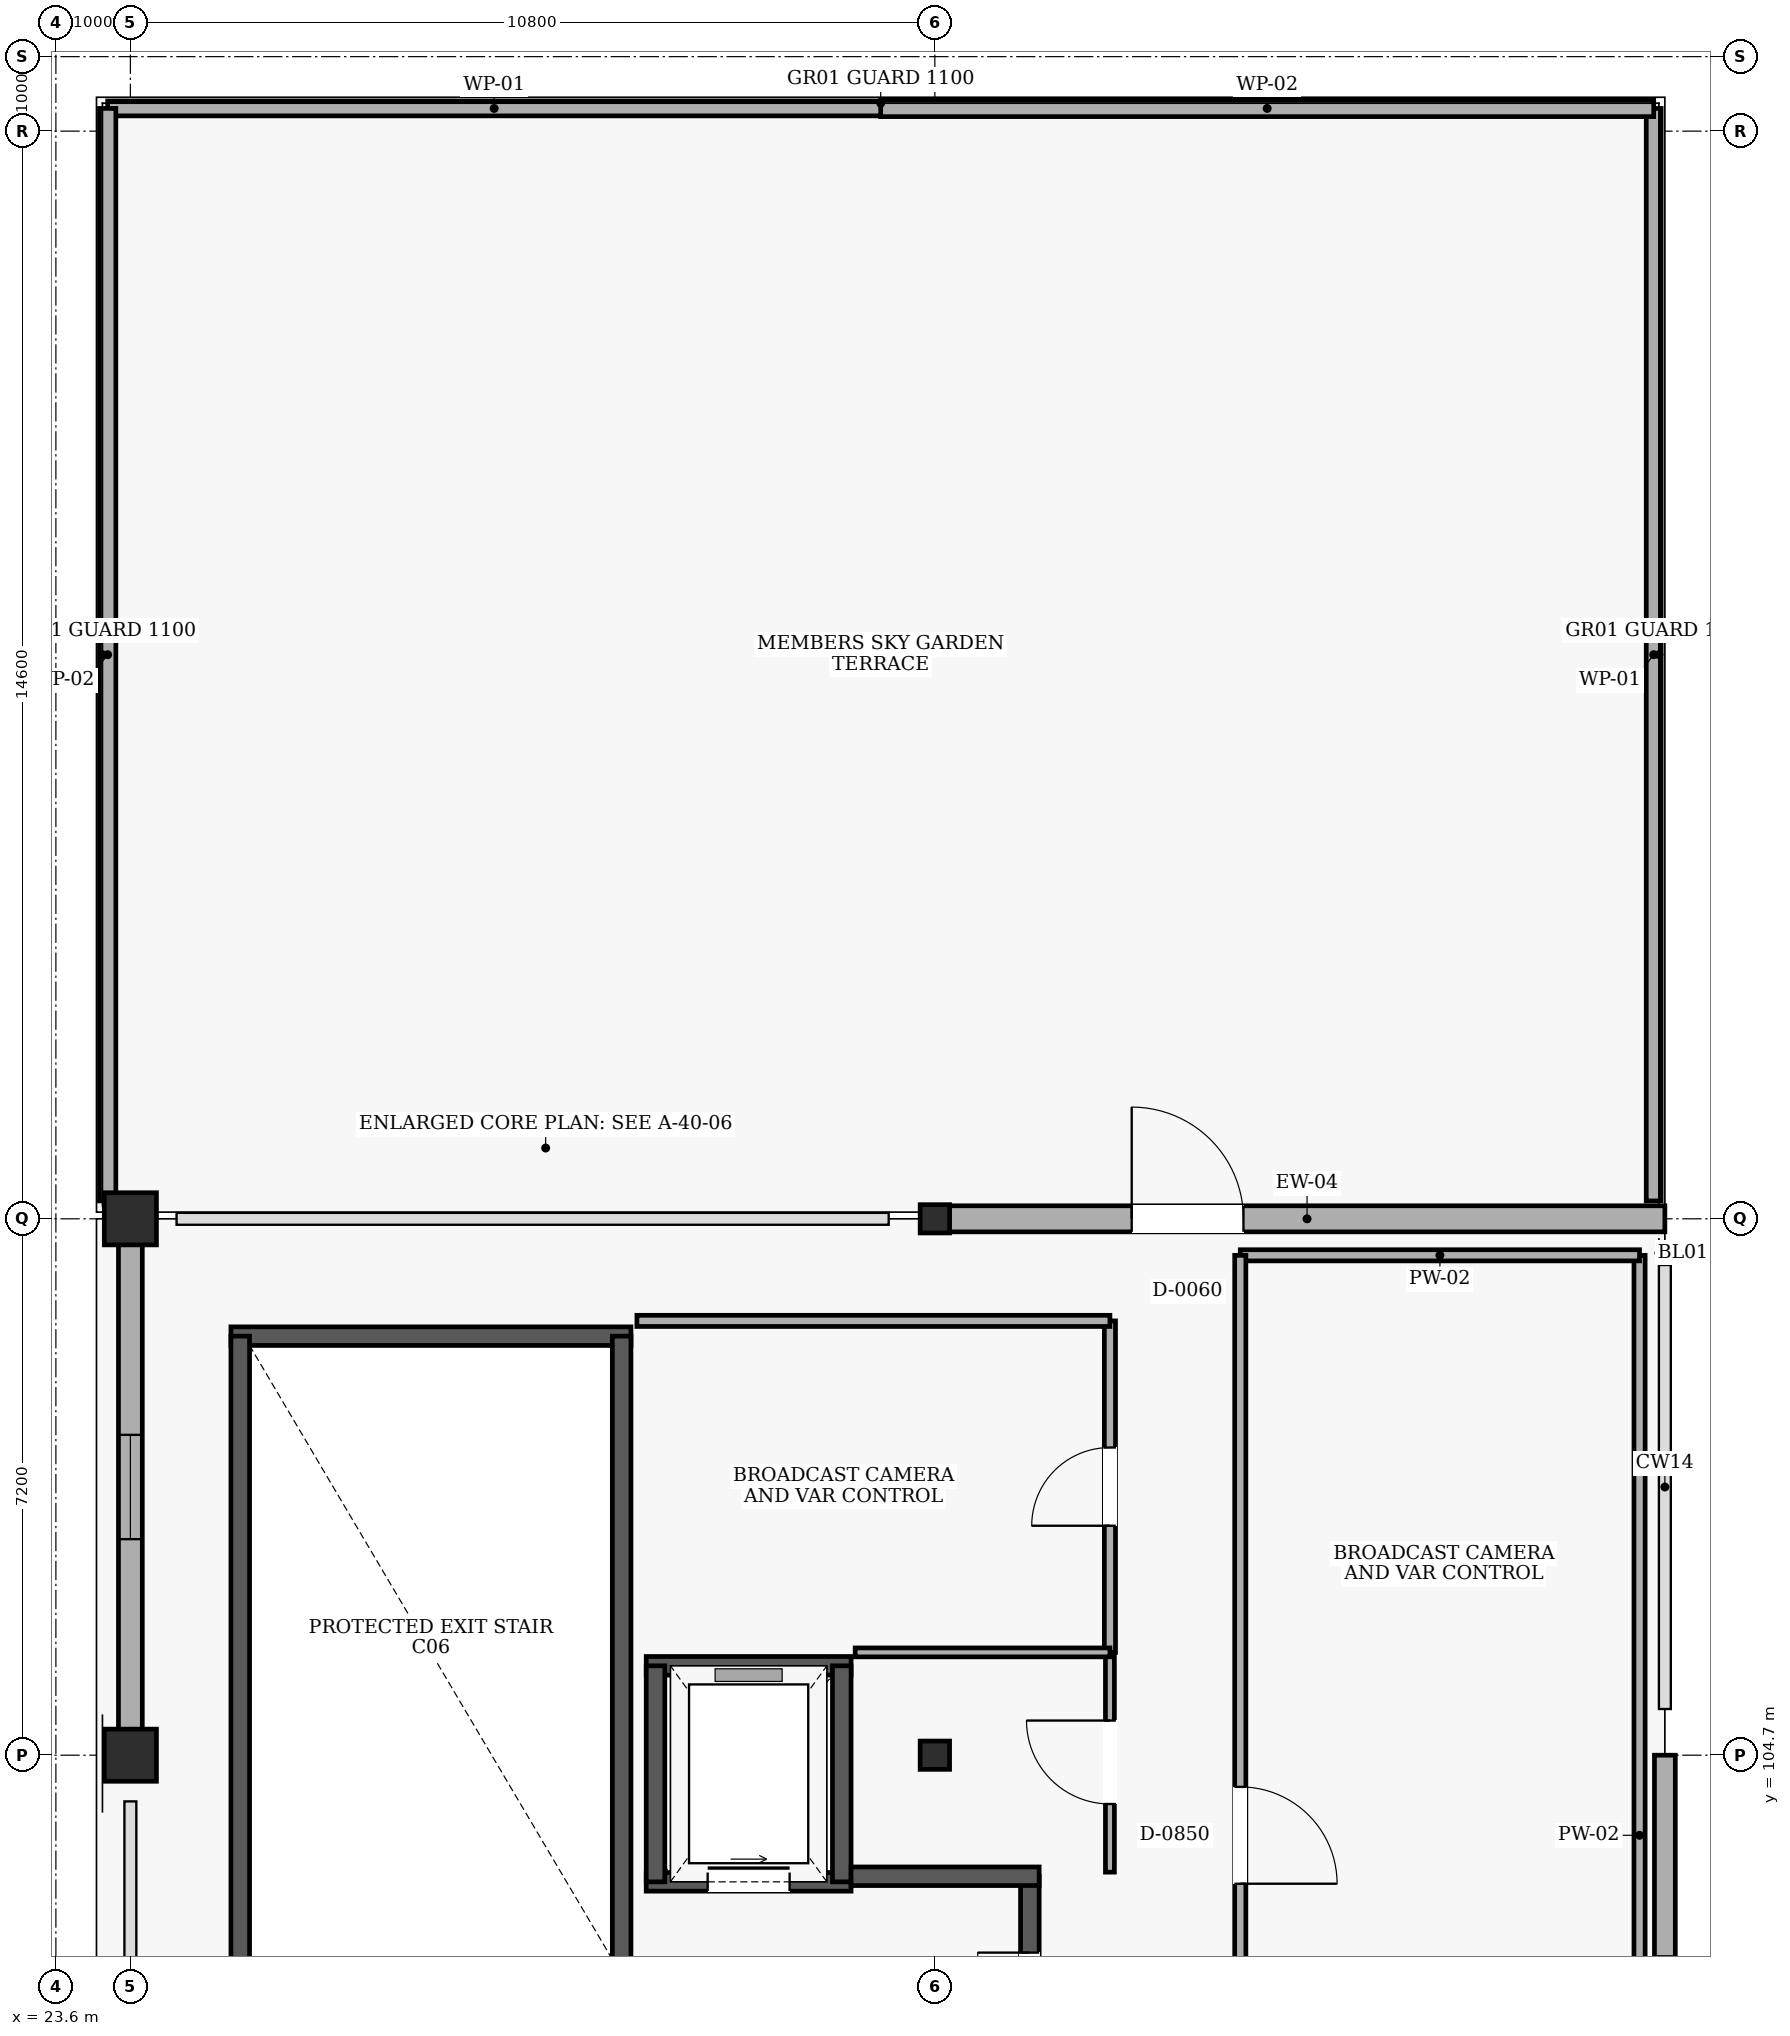
"""IFC4 building model, lengths in metres.
Left out: names, types, materials, properties, quantities, classifications, styles, units other than length and angle.
Written with IfcOpenShell. Run it as: python <this file> out.ifc"""

import sys

from ifc_helpers import new_model, si_unit, direction, frame, frame_2d, origin, origin_2d, place, context, subcontext, project, spatial, rectangle, i_section, extrude, element, fill, save


model = new_model("IFC4")
c1 = context("Model", 3, precision=1e-05, world=origin(), true_north=direction((0.0, 1.0)))
c2 = subcontext(c1, "Body", "Model", "MODEL_VIEW")
j1 = project(units=[si_unit("LENGTHUNIT", "METRE"), si_unit("PLANEANGLEUNIT", "RADIAN")], contexts=[c1])
p1 = place(None, origin())
s1 = spatial("IfcSite", under=j1, at=p1, CompositionType="ELEMENT")
p2 = place(p1, origin())
s2 = spatial("IfcBuilding", under=s1, at=p2, CompositionType="ELEMENT")
p3 = place(p2, frame((0.0, 0.0, 29.4)))
s3 = spatial("IfcBuildingStorey", under=s2, at=p3, CompositionType="ELEMENT", Elevation=29.4)
for number, where, z_axis, x_axis in (
    (1, (24.6, 104.7, 0.0), (0.0, 0.0, 1.0), (1.0, 0.0, 0.0)),
    (2, (24.6, 111.9, 0.0), (0.0, 0.0, 1.0), (1.0, 0.0, 0.0)),
):
    element("IfcColumn", number, at=place(p3, frame(where, z_axis=z_axis, x_axis=x_axis)), inside=s3, PredefinedType="COLUMN", context=c2, shape_type="SweptSolid", body=[
        extrude(rectangle(XDim=0.7, YDim=0.7, at=origin_2d()), origin(), (0.0, 0.0, 1.0), 4.8),
    ])
for number, where, z_axis, x_axis in (
    (3, (35.4, 104.7, 0.0), (0.0, 0.0, 1.0), (1.0, 0.0, 0.0)),
    (4, (35.4, 111.9, 0.0), (0.0, 0.0, 1.0), (1.0, 0.0, 0.0)),
):
    element("IfcColumn", number, at=place(p3, frame(where, z_axis=z_axis, x_axis=x_axis)), inside=s3, PredefinedType="COLUMN", context=c2, shape_type="SweptSolid", body=[
        extrude(i_section(OverallWidth=0.395, OverallDepth=0.38, WebThickness=0.019, FlangeThickness=0.03, at=origin_2d()), origin(), (0.0, 0.0, 1.0), 4.8),
    ])
p4 = place(p3, frame((24.6, 105.045, 0.0), z_axis=(0.0, 0.0, 1.0), x_axis=(0.0, 1.0, 0.0)))
e5 = element("IfcWall", 5, at=p4, inside=s3, PredefinedType="SOLIDWALL", context=c2, shape_type="SweptSolid", body=[
    extrude(rectangle(XDim=6.51, YDim=0.32, at=frame_2d((3.255, 0.0))), origin(), (0.0, 0.0, 1.0), 3.68),
])
p5 = place(p4, frame((2.555, 0.0, 0.9)))
e6 = element("IfcOpeningElement", 6, at=p5, cuts=e5, PredefinedType="OPENING", context=c2, shape_type="SweptSolid", body=[
    extrude(rectangle(XDim=1.4, YDim=2.1, at=frame_2d((0.7, 1.05))), frame((0.0, 0.17, 0.0), z_axis=(0.0, -1.0, 0.0), x_axis=(1.0, 0.0, 0.0)), (0.0, 0.0, 1.0), 0.34),
])
p6 = place(p3, frame((35.593, 111.9, 0.0), z_axis=(0.0, 0.0, 1.0), x_axis=(1.0, 0.0, 0.0)))
e7 = element("IfcWall", 7, at=p6, inside=s3, PredefinedType="SOLIDWALL", context=c2, shape_type="SweptSolid", body=[
    extrude(rectangle(XDim=9.607, YDim=0.35, at=frame_2d((4.804, 0.0))), origin(), (0.0, 0.0, 1.0), 4.48),
])
p7 = place(p6, frame((2.45, 0.0, 0.0)))
e8 = element("IfcOpeningElement", 8, at=p7, cuts=e7, PredefinedType="OPENING", context=c2, shape_type="SweptSolid", body=[
    extrude(rectangle(XDim=1.5, YDim=2.15, at=frame_2d((0.75, 1.075))), frame((0.0, 0.185, 0.0), z_axis=(0.0, -1.0, 0.0), x_axis=(1.0, 0.0, 0.0)), (0.0, 0.0, 1.0), 0.37),
])
p8 = place(p3, frame((45.2, 104.7, 0.0), z_axis=(0.0, 0.0, 1.0), x_axis=(0.0, -1.0, 0.0)))
e9 = element("IfcWall", 9, at=p8, inside=s3, PredefinedType="SOLIDWALL", context=c2, shape_type="SweptSolid", body=[
    extrude(rectangle(XDim=7.2, YDim=0.28, at=frame_2d((3.6, 0.0))), origin(), (0.0, 0.0, 1.0), 4.48),
])
p9 = place(p8, frame((2.7, 0.0, 0.9)))
e10 = element("IfcOpeningElement", 10, at=p9, cuts=e9, PredefinedType="OPENING", context=c2, shape_type="SweptSolid", body=[
    extrude(rectangle(XDim=1.8, YDim=2.1, at=frame_2d((0.9, 1.05))), frame((0.0, 0.15, 0.0), z_axis=(0.0, -1.0, 0.0), x_axis=(1.0, 0.0, 0.0)), (0.0, 0.0, 1.0), 0.3),
])
p10 = place(p3, frame((45.05, 112.14, 0.0), z_axis=(0.0, 0.0, 1.0), x_axis=(0.0, 1.0, 0.0)))
e11 = element("IfcWall", 11, at=p10, inside=s3, PredefinedType="PARAPET", context=c2, shape_type="SweptSolid", body=[
    extrude(rectangle(XDim=14.665, YDim=0.2, at=frame_2d((7.333, 0.0))), origin(), (0.0, 0.0, 1.0), 1.15),
])
p11 = place(p3, frame((45.05, 126.805, 0.0), z_axis=(0.0, 0.0, 1.0), x_axis=(-1.0, 0.0, 0.0)))
e12 = element("IfcWall", 12, at=p11, inside=s3, PredefinedType="PARAPET", context=c2, shape_type="SweptSolid", body=[
    extrude(rectangle(XDim=10.377, YDim=0.22, at=frame_2d((5.189, 0.0))), origin(), (0.0, 0.0, 1.0), 1.15),
])
p12 = place(p3, frame((34.673, 126.805, 0.0), z_axis=(0.0, 0.0, 1.0), x_axis=(-1.0, 0.0, 0.0)))
e13 = element("IfcWall", 13, at=p12, inside=s3, PredefinedType="PARAPET", context=c2, shape_type="SweptSolid", body=[
    extrude(rectangle(XDim=10.378, YDim=0.2, at=frame_2d((5.189, 0.0))), origin(), (0.0, 0.0, 1.0), 1.15),
])
p13 = place(p3, frame((24.295, 126.805, 0.0), z_axis=(0.0, 0.0, 1.0), x_axis=(0.0, -1.0, 0.0)))
e14 = element("IfcWall", 14, at=p13, inside=s3, PredefinedType="PARAPET", context=c2, shape_type="SweptSolid", body=[
    extrude(rectangle(XDim=14.665, YDim=0.22, at=frame_2d((7.333, 0.0))), origin(), (0.0, 0.0, 1.0), 1.15),
])
p14 = place(p3, frame((31.32, 110.325, 0.0), z_axis=(0.0, 0.0, 1.0), x_axis=(-1.0, 0.0, 0.0)))
e15 = element("IfcWall", 15, at=p14, inside=s3, PredefinedType="SHEAR", context=c2, shape_type="SweptSolid", body=[
    extrude(rectangle(XDim=5.37, YDim=0.25, at=frame_2d((2.685, 0.0))), origin(), (0.0, 0.0, 1.0), 4.5),
])
p15 = place(p3, frame((26.075, 99.475, 0.0), z_axis=(0.0, 0.0, 1.0), x_axis=(0.0, 1.0, 0.0)))
e16 = element("IfcWall", 16, at=p15, inside=s3, PredefinedType="SHEAR", context=c2, shape_type="SweptSolid", body=[
    extrude(rectangle(XDim=10.85, YDim=0.25, at=frame_2d((5.425, 0.0))), origin(), (0.0, 0.0, 1.0), 4.5),
])
p16 = place(p3, frame((31.195, 99.475, 0.0), z_axis=(0.0, 0.0, 1.0), x_axis=(0.0, 1.0, 0.0)))
e17 = element("IfcWall", 17, at=p16, inside=s3, PredefinedType="SHEAR", context=c2, shape_type="SweptSolid", body=[
    extrude(rectangle(XDim=10.85, YDim=0.25, at=frame_2d((5.425, 0.0))), origin(), (0.0, 0.0, 1.0), 4.5),
])
p17 = place(p16, frame((0.52, 0.0, 0.0)))
e18 = element("IfcOpeningElement", 18, at=p17, cuts=e17, PredefinedType="OPENING", context=c2, shape_type="SweptSolid", body=[
    extrude(rectangle(XDim=1.4, YDim=2.15, at=frame_2d((0.7, 1.075))), frame((0.0, 0.135, 0.0), z_axis=(0.0, -1.0, 0.0), x_axis=(1.0, 0.0, 0.0)), (0.0, 0.0, 1.0), 0.27),
])
p18 = place(p3, frame((31.525, 103.0, 0.0), z_axis=(0.0, 0.0, 1.0), x_axis=(1.0, 0.0, 0.0)))
e19 = element("IfcWall", 19, at=p18, inside=s3, PredefinedType="SHEAR", context=c2, shape_type="SweptSolid", body=[
    extrude(rectangle(XDim=2.75, YDim=0.25, at=frame_2d((1.375, 0.0))), origin(), (0.0, 0.0, 1.0), 4.5),
])
p19 = place(p18, frame((0.825, 0.0, 0.0)))
e20 = element("IfcOpeningElement", 20, at=p19, cuts=e19, PredefinedType="OPENING", context=c2, shape_type="SweptSolid", body=[
    extrude(rectangle(XDim=1.1, YDim=2.15, at=frame_2d((0.55, 1.075))), frame((0.0, 0.135, 0.0), z_axis=(0.0, -1.0, 0.0), x_axis=(1.0, 0.0, 0.0)), (0.0, 0.0, 1.0), 0.27),
])
p20 = place(p3, frame((34.275, 105.9, 0.0), z_axis=(0.0, 0.0, 1.0), x_axis=(-1.0, 0.0, 0.0)))
e21 = element("IfcWall", 21, at=p20, inside=s3, PredefinedType="SHEAR", context=c2, shape_type="SweptSolid", body=[
    extrude(rectangle(XDim=2.75, YDim=0.25, at=frame_2d((1.375, 0.0))), origin(), (0.0, 0.0, 1.0), 4.5),
])
for number, where, z_axis, x_axis in (
    (22, (31.65, 105.9, 0.0), (0.0, 0.0, 1.0), (0.0, -1.0, 0.0)),
    (23, (34.15, 103.0, 0.0), (0.0, 0.0, 1.0), (0.0, 1.0, 0.0)),
):
    element("IfcWall", number, at=place(p3, frame(where, z_axis=z_axis, x_axis=x_axis)), inside=s3, PredefinedType="SHEAR", context=c2, shape_type="SweptSolid", body=[
        extrude(rectangle(XDim=2.9, YDim=0.25, at=frame_2d((1.45, 0.0))), origin(), (0.0, 0.0, 1.0), 4.5),
    ])
p21 = place(p3, frame((36.675, 99.625, 0.0), z_axis=(0.0, 0.0, 1.0), x_axis=(0.0, 1.0, 0.0)))
e24 = element("IfcWall", 24, at=p21, inside=s3, PredefinedType="SHEAR", context=c2, shape_type="SweptSolid", body=[
    extrude(rectangle(XDim=3.45, YDim=0.25, at=frame_2d((1.725, 0.0))), origin(), (0.0, 0.0, 1.0), 4.5),
])
p22 = place(p21, frame((1.025, 0.0, 0.0)))
e25 = element("IfcOpeningElement", 25, at=p22, cuts=e24, PredefinedType="OPENING", context=c2, shape_type="SweptSolid", body=[
    extrude(rectangle(XDim=1.4, YDim=2.15, at=frame_2d((0.7, 1.075))), frame((0.0, 0.135, 0.0), z_axis=(0.0, -1.0, 0.0), x_axis=(1.0, 0.0, 0.0)), (0.0, 0.0, 1.0), 0.27),
])
p23 = place(p3, frame((34.275, 103.075, 0.0), z_axis=(0.0, 0.0, 1.0), x_axis=(1.0, 0.0, 0.0)))
e26 = element("IfcWall", 26, at=p23, inside=s3, PredefinedType="SHEAR", context=c2, shape_type="SweptSolid", body=[
    extrude(rectangle(XDim=2.525, YDim=0.25, at=frame_2d((1.263, 0.0))), origin(), (0.0, 0.0, 1.0), 4.5),
])
p24 = place(p3, frame((37.75, 106.08, 0.0), z_axis=(0.0, 0.0, 1.0), x_axis=(0.0, 1.0, 0.0)))
e27 = element("IfcWall", 27, at=p24, inside=s3, PredefinedType="PARTITIONING", context=c2, shape_type="SweptSolid", body=[
    extrude(rectangle(XDim=4.45, YDim=0.15, at=frame_2d((2.225, 0.0))), origin(), (0.0, 0.0, 1.0), 4.5),
])
p25 = place(p24, frame((1.7, 0.0, 0.0)))
e28 = element("IfcOpeningElement", 28, at=p25, cuts=e27, PredefinedType="OPENING", context=c2, shape_type="SweptSolid", body=[
    extrude(rectangle(XDim=1.05, YDim=2.15, at=frame_2d((0.525, 1.075))), frame((0.0, 0.085, 0.0), z_axis=(0.0, -1.0, 0.0), x_axis=(1.0, 0.0, 0.0)), (0.0, 0.0, 1.0), 0.17),
])
p26 = place(p3, frame((37.75, 110.53, 0.0), z_axis=(0.0, 0.0, 1.0), x_axis=(-1.0, 0.0, 0.0)))
e29 = element("IfcWall", 29, at=p26, inside=s3, PredefinedType="PARTITIONING", context=c2, shape_type="SweptSolid", body=[
    extrude(rectangle(XDim=6.35, YDim=0.15, at=frame_2d((3.175, 0.0))), origin(), (0.0, 0.0, 1.0), 4.5),
])
p27 = place(p3, frame((37.75, 103.13, 0.0), z_axis=(0.0, 0.0, 1.0), x_axis=(0.0, 1.0, 0.0)))
e30 = element("IfcWall", 30, at=p27, inside=s3, PredefinedType="PARTITIONING", context=c2, shape_type="SweptSolid", body=[
    extrude(rectangle(XDim=2.95, YDim=0.12, at=frame_2d((1.475, 0.0))), origin(), (0.0, 0.0, 1.0), 4.5),
])
p28 = place(p27, frame((0.915, 0.0, 0.0)))
e31 = element("IfcOpeningElement", 31, at=p28, cuts=e30, PredefinedType="OPENING", context=c2, shape_type="SweptSolid", body=[
    extrude(rectangle(XDim=1.12, YDim=2.15, at=frame_2d((0.56, 1.075))), frame((0.0, 0.07, 0.0), z_axis=(0.0, -1.0, 0.0), x_axis=(1.0, 0.0, 0.0)), (0.0, 0.0, 1.0), 0.14),
])
p29 = place(p3, frame((37.75, 106.08, 0.0), z_axis=(0.0, 0.0, 1.0), x_axis=(-1.0, 0.0, 0.0)))
e32 = element("IfcWall", 32, at=p29, inside=s3, PredefinedType="PARTITIONING", context=c2, shape_type="SweptSolid", body=[
    extrude(rectangle(XDim=3.42, YDim=0.12, at=frame_2d((1.71, 0.0))), origin(), (0.0, 0.0, 1.0), 4.5),
])
p30 = place(p3, frame((44.86, 95.84, 0.0), z_axis=(0.0, 0.0, 1.0), x_axis=(0.0, 1.0, 0.0)))
e33 = element("IfcWall", 33, at=p30, inside=s3, PredefinedType="PARTITIONING", context=c2, shape_type="SweptSolid", body=[
    extrude(rectangle(XDim=15.57, YDim=0.15, at=frame_2d((7.785, 0.0))), origin(), (0.0, 0.0, 1.0), 4.5),
])
p31 = place(p3, frame((44.86, 111.41, 0.0), z_axis=(0.0, 0.0, 1.0), x_axis=(-1.0, 0.0, 0.0)))
e34 = element("IfcWall", 34, at=p31, inside=s3, PredefinedType="PARTITIONING", context=c2, shape_type="SweptSolid", body=[
    extrude(rectangle(XDim=5.36, YDim=0.15, at=frame_2d((2.68, 0.0))), origin(), (0.0, 0.0, 1.0), 4.5),
])
p32 = place(p3, frame((39.5, 111.41, 0.0), z_axis=(0.0, 0.0, 1.0), x_axis=(0.0, -1.0, 0.0)))
e35 = element("IfcWall", 35, at=p32, inside=s3, PredefinedType="PARTITIONING", context=c2, shape_type="SweptSolid", body=[
    extrude(rectangle(XDim=15.57, YDim=0.15, at=frame_2d((7.785, 0.0))), origin(), (0.0, 0.0, 1.0), 4.5),
])
p33 = place(p32, frame((7.135, 0.0, 0.0)))
e36 = element("IfcOpeningElement", 36, at=p33, cuts=e35, PredefinedType="OPENING", context=c2, shape_type="SweptSolid", body=[
    extrude(rectangle(XDim=1.3, YDim=2.2, at=frame_2d((0.65, 1.1))), frame((0.0, 0.085, 0.0), z_axis=(0.0, -1.0, 0.0), x_axis=(1.0, 0.0, 0.0)), (0.0, 0.0, 1.0), 0.17),
])
p34 = place(p5, origin())
e37 = element("IfcWindow", 37, at=p34, inside=s3, PartitioningType="SINGLE_PANEL", PredefinedType="WINDOW", context=c2, shape_type="SweptSolid", body=[
    extrude(rectangle(XDim=1.4, YDim=2.1, at=frame_2d((0.7, 1.05))), frame((0.0, 0.03, 0.0), z_axis=(0.0, -1.0, 0.0), x_axis=(1.0, 0.0, 0.0)), (0.0, 0.0, 1.0), 0.06),
])
fill(e6, e37)
p35 = place(p7, origin())
e38 = element("IfcDoor", 38, at=p35, inside=s3, OperationType="SINGLE_SWING_LEFT", PredefinedType="DOOR", context=c2, shape_type="SweptSolid", body=[
    extrude(rectangle(XDim=1.5, YDim=2.15, at=frame_2d((0.75, 1.075))), frame((0.0, 0.025, 0.0), z_axis=(0.0, -1.0, 0.0), x_axis=(1.0, 0.0, 0.0)), (0.0, 0.0, 1.0), 0.05),
])
fill(e8, e38)
p36 = place(p9, origin())
e39 = element("IfcWindow", 39, at=p36, inside=s3, PartitioningType="SINGLE_PANEL", PredefinedType="WINDOW", context=c2, shape_type="SweptSolid", body=[
    extrude(rectangle(XDim=1.8, YDim=2.1, at=frame_2d((0.9, 1.05))), frame((0.0, 0.03, 0.0), z_axis=(0.0, -1.0, 0.0), x_axis=(1.0, 0.0, 0.0)), (0.0, 0.0, 1.0), 0.06),
])
fill(e10, e39)
p37 = place(p19, origin())
e40 = element("IfcDoor", 40, at=p37, inside=s3, OperationType="SLIDING_TO_LEFT", PredefinedType="DOOR", context=c2, shape_type="SweptSolid", body=[
    extrude(rectangle(XDim=1.1, YDim=2.15, at=frame_2d((0.55, 1.075))), frame((0.0, 0.025, 0.0), z_axis=(0.0, -1.0, 0.0), x_axis=(1.0, 0.0, 0.0)), (0.0, 0.0, 1.0), 0.05),
])
fill(e20, e40)
p38 = place(p22, origin())
e41 = element("IfcDoor", 41, at=p38, inside=s3, OperationType="DOUBLE_DOOR_SINGLE_SWING", PredefinedType="DOOR", context=c2, shape_type="SweptSolid", body=[
    extrude(rectangle(XDim=1.4, YDim=2.15, at=frame_2d((0.7, 1.075))), frame((0.0, 0.025, 0.0), z_axis=(0.0, -1.0, 0.0), x_axis=(1.0, 0.0, 0.0)), (0.0, 0.0, 1.0), 0.05),
])
fill(e25, e41)
p39 = place(p25, origin())
e42 = element("IfcDoor", 42, at=p39, inside=s3, OperationType="SINGLE_SWING_LEFT", PredefinedType="DOOR", context=c2, shape_type="SweptSolid", body=[
    extrude(rectangle(XDim=1.05, YDim=2.15, at=frame_2d((0.525, 1.075))), frame((0.0, 0.025, 0.0), z_axis=(0.0, -1.0, 0.0), x_axis=(1.0, 0.0, 0.0)), (0.0, 0.0, 1.0), 0.05),
])
fill(e28, e42)
p40 = place(p28, origin())
e43 = element("IfcDoor", 43, at=p40, inside=s3, OperationType="SINGLE_SWING_RIGHT", PredefinedType="DOOR", context=c2, shape_type="SweptSolid", body=[
    extrude(rectangle(XDim=1.12, YDim=2.15, at=frame_2d((0.56, 1.075))), frame((0.0, 0.025, 0.0), z_axis=(0.0, -1.0, 0.0), x_axis=(1.0, 0.0, 0.0)), (0.0, 0.0, 1.0), 0.05),
])
fill(e31, e43)
p41 = place(p33, origin())
e44 = element("IfcDoor", 44, at=p41, inside=s3, OperationType="SINGLE_SWING_RIGHT", PredefinedType="DOOR", context=c2, shape_type="SweptSolid", body=[
    extrude(rectangle(XDim=1.3, YDim=2.2, at=frame_2d((0.65, 1.1))), frame((0.0, 0.025, 0.0), z_axis=(0.0, -1.0, 0.0), x_axis=(1.0, 0.0, 0.0)), (0.0, 0.0, 1.0), 0.05),
])
fill(e36, e44)
save(model, sys.argv[1])
